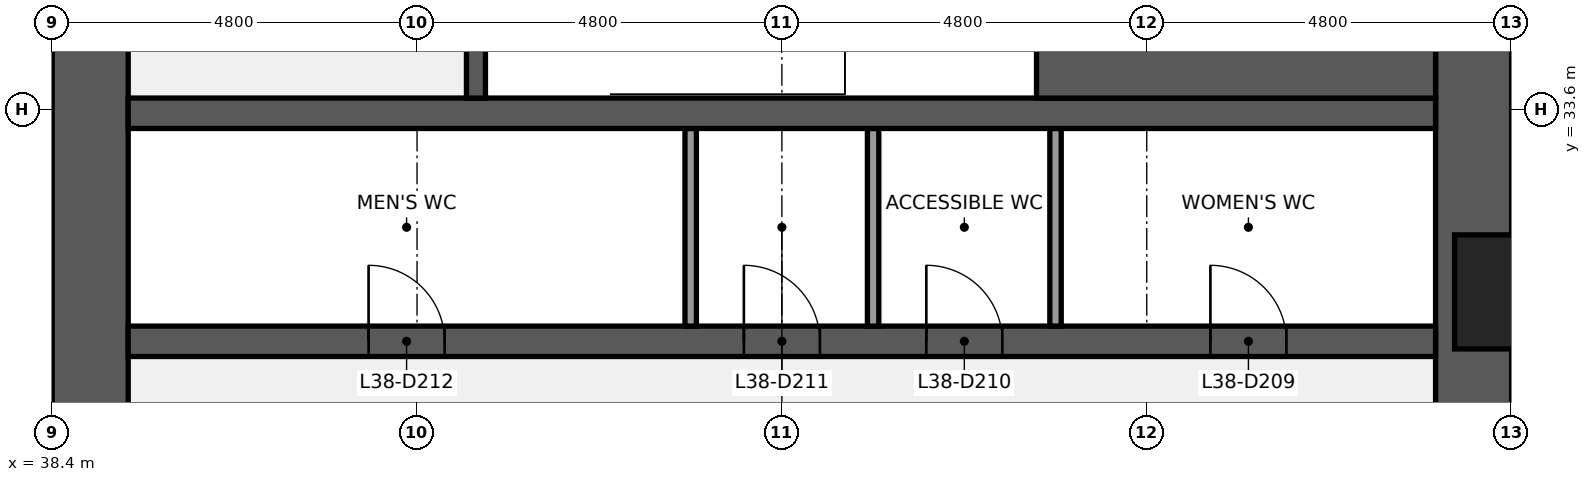
"""IFC4 building model, lengths in metres.
Left out: names, types, materials, properties, quantities, classifications, styles, units other than length and angle.
Written with IfcOpenShell. Run it as: python <this file> out.ifc"""

import sys

from ifc_helpers import new_model, si_unit, direction, frame, frame_2d, origin, place, context, subcontext, project, spatial, rectangle, extrude, element, fill, save


model = new_model("IFC4")
c1 = context("Model", 3, precision=1e-05, world=origin(), true_north=direction((0.0, 1.0)))
c2 = subcontext(c1, "Body", "Model", "MODEL_VIEW")
j1 = project(units=[si_unit("LENGTHUNIT", "METRE"), si_unit("PLANEANGLEUNIT", "RADIAN")], contexts=[c1])
p1 = place(None, origin())
s1 = spatial("IfcSite", under=j1, at=p1, CompositionType="ELEMENT")
p2 = place(p1, origin())
s2 = spatial("IfcBuilding", under=s1, at=p2, CompositionType="ELEMENT")
p3 = place(p2, frame((0.0, 0.0, 172.1)))
s3 = spatial("IfcBuildingStorey", under=s2, at=p3, CompositionType="ELEMENT", Elevation=172.1)
p4 = place(p3, frame((57.1, 38.4, 0.0), z_axis=(0.0, 0.0, 1.0), x_axis=(0.0, -1.0, 0.0)))
e1 = element("IfcWall", 1, at=p4, inside=s3, PredefinedType="SHEAR", context=c2, shape_type="SweptSolid", body=[
    extrude(rectangle(XDim=28.8, YDim=1.0, at=frame_2d((14.4, 0.0))), origin(), (0.0, 0.0, 1.0), 3.7),
])
p5 = place(p4, frame((18.45, 0.0, 0.9)))
e2 = element("IfcOpeningElement", 2, at=p5, cuts=e1, PredefinedType="OPENING", context=c2, shape_type="SweptSolid", body=[
    extrude(rectangle(XDim=1.5, YDim=1.5, at=frame_2d((0.75, 0.75))), frame((0.0, 0.51, 0.0), z_axis=(0.0, -1.0, 0.0), x_axis=(1.0, 0.0, 0.0)), (0.0, 0.0, 1.0), 1.02),
])
p6 = place(p4, frame((8.85, 0.0, 0.9)))
e3 = element("IfcOpeningElement", 3, at=p6, cuts=e1, PredefinedType="OPENING", context=c2, shape_type="SweptSolid", body=[
    extrude(rectangle(XDim=1.5, YDim=1.5, at=frame_2d((0.75, 0.75))), frame((0.0, 0.51, 0.0), z_axis=(0.0, -1.0, 0.0), x_axis=(1.0, 0.0, 0.0)), (0.0, 0.0, 1.0), 1.02),
])
p7 = place(p3, frame((38.9, 9.6, 0.0), z_axis=(0.0, 0.0, 1.0), x_axis=(0.0, 1.0, 0.0)))
e4 = element("IfcWall", 4, at=p7, inside=s3, PredefinedType="SHEAR", context=c2, shape_type="SweptSolid", body=[
    extrude(rectangle(XDim=28.8, YDim=1.0, at=frame_2d((14.4, 0.0))), origin(), (0.0, 0.0, 1.0), 3.7),
])
p8 = place(p7, frame((8.7, 0.0, 0.0)))
e5 = element("IfcOpeningElement", 5, at=p8, cuts=e4, PredefinedType="OPENING", context=c2, shape_type="SweptSolid", body=[
    extrude(rectangle(XDim=1.8, YDim=2.1, at=frame_2d((0.9, 1.05))), frame((0.0, 0.51, 0.0), z_axis=(0.0, -1.0, 0.0), x_axis=(1.0, 0.0, 0.0)), (0.0, 0.0, 1.0), 1.02),
])
p9 = place(p7, frame((18.3, 0.0, 0.0)))
e6 = element("IfcOpeningElement", 6, at=p9, cuts=e4, PredefinedType="OPENING", context=c2, shape_type="SweptSolid", body=[
    extrude(rectangle(XDim=1.8, YDim=2.1, at=frame_2d((0.9, 1.05))), frame((0.0, 0.51, 0.0), z_axis=(0.0, -1.0, 0.0), x_axis=(1.0, 0.0, 0.0)), (0.0, 0.0, 1.0), 1.02),
])
p10 = place(p3, frame((39.4, 30.55, 0.0), z_axis=(0.0, 0.0, 1.0), x_axis=(1.0, 0.0, 0.0)))
e7 = element("IfcWall", 7, at=p10, inside=s3, PredefinedType="SHEAR", context=c2, shape_type="SweptSolid", body=[
    extrude(rectangle(XDim=17.2, YDim=0.4, at=frame_2d((8.6, 0.0))), origin(), (0.0, 0.0, 1.0), 3.7),
])
p11 = place(p10, frame((14.238, 0.0, 0.0)))
e8 = element("IfcOpeningElement", 8, at=p11, cuts=e7, PredefinedType="OPENING", context=c2, shape_type="SweptSolid", body=[
    extrude(rectangle(XDim=1.0, YDim=2.1, at=frame_2d((0.5, 1.05))), frame((0.0, 0.21, 0.0), z_axis=(0.0, -1.0, 0.0), x_axis=(1.0, 0.0, 0.0)), (0.0, 0.0, 1.0), 0.42),
])
p12 = place(p10, frame((10.5, 0.0, 0.0)))
e9 = element("IfcOpeningElement", 9, at=p12, cuts=e7, PredefinedType="OPENING", context=c2, shape_type="SweptSolid", body=[
    extrude(rectangle(XDim=1.0, YDim=2.1, at=frame_2d((0.5, 1.05))), frame((0.0, 0.21, 0.0), z_axis=(0.0, -1.0, 0.0), x_axis=(1.0, 0.0, 0.0)), (0.0, 0.0, 1.0), 0.42),
])
p13 = place(p10, frame((8.1, 0.0, 0.0)))
e10 = element("IfcOpeningElement", 10, at=p13, cuts=e7, PredefinedType="OPENING", context=c2, shape_type="SweptSolid", body=[
    extrude(rectangle(XDim=1.0, YDim=2.1, at=frame_2d((0.5, 1.05))), frame((0.0, 0.21, 0.0), z_axis=(0.0, -1.0, 0.0), x_axis=(1.0, 0.0, 0.0)), (0.0, 0.0, 1.0), 0.42),
])
p14 = place(p10, frame((3.163, 0.0, 0.0)))
e11 = element("IfcOpeningElement", 11, at=p14, cuts=e7, PredefinedType="OPENING", context=c2, shape_type="SweptSolid", body=[
    extrude(rectangle(XDim=1.0, YDim=2.1, at=frame_2d((0.5, 1.05))), frame((0.0, 0.21, 0.0), z_axis=(0.0, -1.0, 0.0), x_axis=(1.0, 0.0, 0.0)), (0.0, 0.0, 1.0), 0.42),
])
for number, where, z_axis, x_axis in (
    (12, (51.6, 30.75, 0.0), (0.0, 0.0, 1.0), (0.0, 1.0, 0.0)),
    (13, (49.2, 30.75, 0.0), (0.0, 0.0, 1.0), (0.0, 1.0, 0.0)),
    (14, (46.8, 30.75, 0.0), (0.0, 0.0, 1.0), (0.0, 1.0, 0.0)),
):
    element("IfcWall", number, at=place(p3, frame(where, z_axis=z_axis, x_axis=x_axis)), inside=s3, PredefinedType="PARTITIONING", context=c2, shape_type="SweptSolid", body=[
        extrude(rectangle(XDim=2.6, YDim=0.15, at=frame_2d((1.3, 0.0))), origin(), (0.0, 0.0, 1.0), 3.7),
    ])
p15 = place(p3, frame((39.4, 33.55, 0.0), z_axis=(0.0, 0.0, 1.0), x_axis=(1.0, 0.0, 0.0)))
e15 = element("IfcWall", 15, at=p15, inside=s3, PredefinedType="SHEAR", context=c2, shape_type="SweptSolid", body=[
    extrude(rectangle(XDim=17.2, YDim=0.4, at=frame_2d((8.6, 0.0))), origin(), (0.0, 0.0, 1.0), 3.7),
])
p16 = place(p3, frame((51.35, 35.575, 0.0), z_axis=(0.0, 0.0, 1.0), x_axis=(1.0, 0.0, 0.0)))
e16 = element("IfcWall", 16, at=p16, inside=s3, PredefinedType="SHEAR", context=c2, shape_type="SweptSolid", body=[
    extrude(rectangle(XDim=5.25, YDim=3.65, at=frame_2d((2.625, 0.0))), origin(), (0.0, 0.0, 1.0), 3.7),
])
p17 = place(p3, frame((43.975, 33.75, 0.0), z_axis=(0.0, 0.0, 1.0), x_axis=(0.0, 1.0, 0.0)))
e17 = element("IfcWall", 17, at=p17, inside=s3, PredefinedType="SHEAR", context=c2, shape_type="SweptSolid", body=[
    extrude(rectangle(XDim=3.45, YDim=0.25, at=frame_2d((1.725, 0.0))), origin(), (0.0, 0.0, 1.0), 3.7),
])
p18 = place(p17, frame((1.175, 0.0, 0.0)))
e18 = element("IfcOpeningElement", 18, at=p18, cuts=e17, PredefinedType="OPENING", context=c2, shape_type="SweptSolid", body=[
    extrude(rectangle(XDim=1.1, YDim=2.1, at=frame_2d((0.55, 1.05))), frame((0.0, 0.135, 0.0), z_axis=(0.0, -1.0, 0.0), x_axis=(1.0, 0.0, 0.0)), (0.0, 0.0, 1.0), 0.27),
])
p19 = place(p11, origin())
e19 = element("IfcDoor", 19, at=p19, inside=s3, OperationType="SINGLE_SWING_LEFT", PredefinedType="DOOR", context=c2, shape_type="SweptSolid", body=[
    extrude(rectangle(XDim=1.0, YDim=2.1, at=frame_2d((0.5, 1.05))), frame((0.0, 0.025, 0.0), z_axis=(0.0, -1.0, 0.0), x_axis=(1.0, 0.0, 0.0)), (0.0, 0.0, 1.0), 0.05),
])
fill(e8, e19)
p20 = place(p12, origin())
e20 = element("IfcDoor", 20, at=p20, inside=s3, OperationType="SINGLE_SWING_LEFT", PredefinedType="DOOR", context=c2, shape_type="SweptSolid", body=[
    extrude(rectangle(XDim=1.0, YDim=2.1, at=frame_2d((0.5, 1.05))), frame((0.0, 0.025, 0.0), z_axis=(0.0, -1.0, 0.0), x_axis=(1.0, 0.0, 0.0)), (0.0, 0.0, 1.0), 0.05),
])
fill(e9, e20)
p21 = place(p13, origin())
e21 = element("IfcDoor", 21, at=p21, inside=s3, OperationType="SINGLE_SWING_LEFT", PredefinedType="DOOR", context=c2, shape_type="SweptSolid", body=[
    extrude(rectangle(XDim=1.0, YDim=2.1, at=frame_2d((0.5, 1.05))), frame((0.0, 0.025, 0.0), z_axis=(0.0, -1.0, 0.0), x_axis=(1.0, 0.0, 0.0)), (0.0, 0.0, 1.0), 0.05),
])
fill(e10, e21)
p22 = place(p14, origin())
e22 = element("IfcDoor", 22, at=p22, inside=s3, OperationType="SINGLE_SWING_LEFT", PredefinedType="DOOR", context=c2, shape_type="SweptSolid", body=[
    extrude(rectangle(XDim=1.0, YDim=2.1, at=frame_2d((0.5, 1.05))), frame((0.0, 0.025, 0.0), z_axis=(0.0, -1.0, 0.0), x_axis=(1.0, 0.0, 0.0)), (0.0, 0.0, 1.0), 0.05),
])
fill(e11, e22)
save(model, sys.argv[1])
